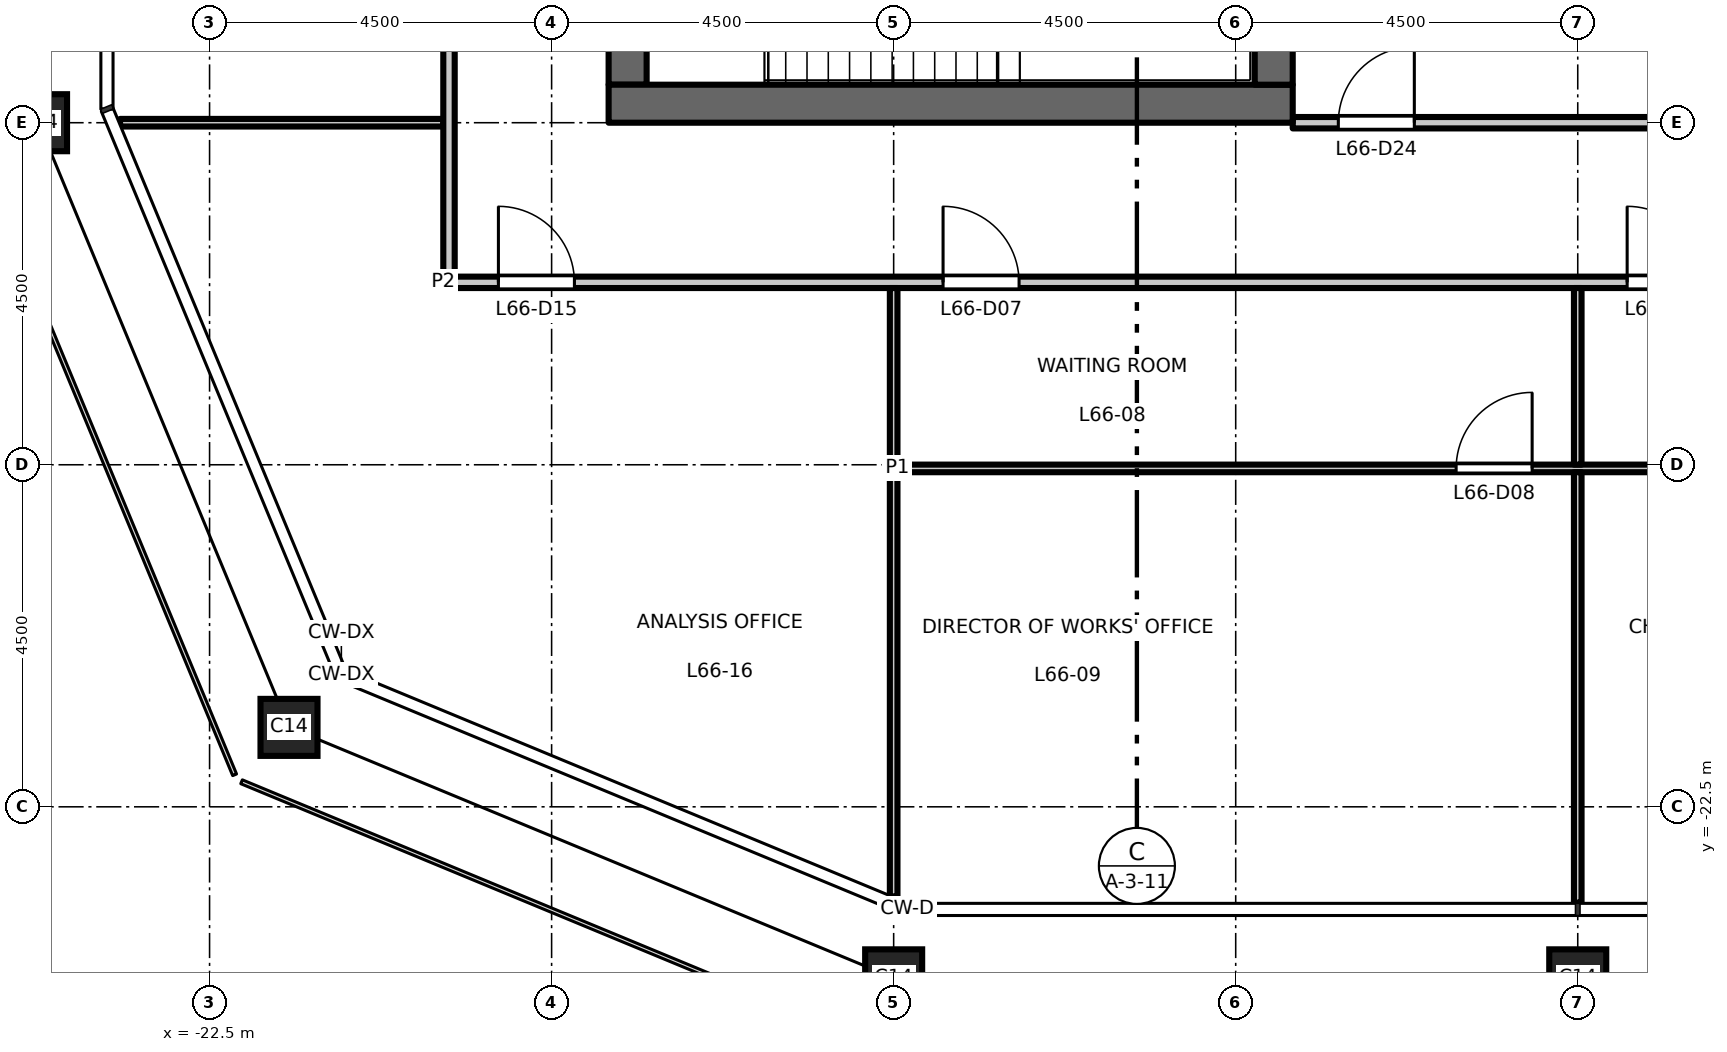
"""IFC4 building model, lengths in metres.
Left out: names, types, materials, properties, quantities, classifications, styles, units other than length and angle.
Written with IfcOpenShell. Run it as: python <this file> out.ifc"""

import sys

from ifc_helpers import new_model, si_unit, direction, frame, frame_2d, origin, origin_2d, place, context, subcontext, project, spatial, rectangle, hollow_rectangle, extrude, element, fill, save


model = new_model("IFC4")
c1 = context("Model", 3, precision=1e-05, world=origin(), true_north=direction((0.0, 1.0)))
c2 = subcontext(c1, "Body", "Model", "MODEL_VIEW")
j1 = project(units=[si_unit("LENGTHUNIT", "METRE"), si_unit("PLANEANGLEUNIT", "RADIAN")], contexts=[c1])
p1 = place(None, origin())
s1 = spatial("IfcSite", under=j1, at=p1, CompositionType="ELEMENT")
p2 = place(p1, origin())
s2 = spatial("IfcBuilding", under=s1, at=p2, CompositionType="ELEMENT")
p3 = place(p2, frame((0.0, 0.0, 307.7)))
s3 = spatial("IfcBuildingStorey", under=s2, at=p3, CompositionType="ELEMENT", Elevation=307.7)
for number, where, z_axis, x_axis in (
    (1, (-13.5, -24.75, 0.0), (0.0, 0.0, 1.0), (1.0, 0.0, 0.0)),
    (2, (-4.5, -24.75, 0.0), (0.0, 0.0, 1.0), (1.0, 0.0, 0.0)),
    (3, (-24.75, -13.5, 0.0), (0.0, 0.0, 1.0), (1.0, 0.0, 0.0)),
    (4, (-21.455, -21.455, 0.0), (0.0, 0.0, 1.0), (1.0, 0.0, 0.0)),
):
    element("IfcColumn", number, at=place(p3, frame(where, z_axis=z_axis, x_axis=x_axis)), inside=s3, PredefinedType="COLUMN", context=c2, shape_type="SweptSolid", body=[
        extrude(hollow_rectangle(XDim=0.75, YDim=0.75, WallThickness=0.04, at=origin_2d()), origin(), (0.0, 0.0, 1.0), 4.5),
    ])
p4 = place(p3, frame((-17.0, -13.0, 0.0), z_axis=(0.0, 0.0, 1.0), x_axis=(0.0, 1.0, 0.0)))
e5 = element("IfcWall", 5, at=p4, inside=s3, PredefinedType="SHEAR", context=c2, shape_type="SweptSolid", body=[
    extrude(rectangle(XDim=26.0, YDim=0.5, at=frame_2d((13.0, 0.0))), origin(), (0.0, 0.0, 1.0), 4.35),
])
p5 = place(p4, frame((16.825, 0.0, 0.0)))
e6 = element("IfcOpeningElement", 6, at=p5, cuts=e5, PredefinedType="OPENING", context=c2, shape_type="SweptSolid", body=[
    extrude(rectangle(XDim=1.8, YDim=2.1, at=frame_2d((0.9, 1.05))), frame((0.0, 0.26, 0.0), z_axis=(0.0, -1.0, 0.0), x_axis=(1.0, 0.0, 0.0)), (0.0, 0.0, 1.0), 0.52),
])
p6 = place(p4, frame((7.375, 0.0, 0.0)))
e7 = element("IfcOpeningElement", 7, at=p6, cuts=e5, PredefinedType="OPENING", context=c2, shape_type="SweptSolid", body=[
    extrude(rectangle(XDim=1.8, YDim=2.1, at=frame_2d((0.9, 1.05))), frame((0.0, 0.26, 0.0), z_axis=(0.0, -1.0, 0.0), x_axis=(1.0, 0.0, 0.0)), (0.0, 0.0, 1.0), 0.52),
])
p7 = place(p3, frame((-8.25, -13.25, 0.0), z_axis=(0.0, 0.0, 1.0), x_axis=(-1.0, 0.0, 0.0)))
e8 = element("IfcWall", 8, at=p7, inside=s3, PredefinedType="SHEAR", context=c2, shape_type="SweptSolid", body=[
    extrude(rectangle(XDim=9.0, YDim=0.5, at=frame_2d((4.5, 0.0))), origin(), (0.0, 0.0, 1.0), 4.35),
])
p8 = place(p3, frame((-8.5, -13.0, 0.0), z_axis=(0.0, 0.0, 1.0), x_axis=(0.0, 1.0, 0.0)))
e9 = element("IfcWall", 9, at=p8, inside=s3, PredefinedType="SHEAR", context=c2, shape_type="SweptSolid", body=[
    extrude(rectangle(XDim=26.0, YDim=0.5, at=frame_2d((13.0, 0.0))), origin(), (0.0, 0.0, 1.0), 4.35),
])
p9 = place(p3, frame((-13.45, -18.048, 0.0), z_axis=(0.0, 0.0, 1.0), x_axis=(1.0, 0.0, 0.0)))
e10 = element("IfcWall", 10, at=p9, inside=s3, PredefinedType="PARTITIONING", context=c2, shape_type="SweptSolid", body=[
    extrude(rectangle(XDim=17.9, YDim=0.1, at=frame_2d((8.95, 0.0))), origin(), (0.0, 0.0, 1.0), 3.99),
])
p10 = place(p9, frame((7.35, 0.0, 0.0)))
e11 = element("IfcOpeningElement", 11, at=p10, cuts=e10, PredefinedType="OPENING", context=c2, shape_type="SweptSolid", body=[
    extrude(rectangle(XDim=1.0, YDim=2.1, at=frame_2d((0.5, 1.05))), frame((0.0, 0.06, 0.0), z_axis=(0.0, -1.0, 0.0), x_axis=(1.0, 0.0, 0.0)), (0.0, 0.0, 1.0), 0.12),
])
p11 = place(p9, frame((16.35, 0.0, 0.0)))
e12 = element("IfcOpeningElement", 12, at=p11, cuts=e10, PredefinedType="OPENING", context=c2, shape_type="SweptSolid", body=[
    extrude(rectangle(XDim=1.0, YDim=2.1, at=frame_2d((0.5, 1.05))), frame((0.0, 0.06, 0.0), z_axis=(0.0, -1.0, 0.0), x_axis=(1.0, 0.0, 0.0)), (0.0, 0.0, 1.0), 0.12),
])
p12 = place(p3, frame((-19.425, -15.6, 0.0), z_axis=(0.0, 0.0, 1.0), x_axis=(1.0, 0.0, 0.0)))
e13 = element("IfcWall", 13, at=p12, inside=s3, PredefinedType="PARTITIONING", context=c2, shape_type="SweptSolid", body=[
    extrude(rectangle(XDim=38.85, YDim=0.15, at=frame_2d((19.425, 0.0))), origin(), (0.0, 0.0, 1.0), 4.35),
])
p13 = place(p12, frame((6.575, 0.0, 0.0)))
e14 = element("IfcOpeningElement", 14, at=p13, cuts=e13, PredefinedType="OPENING", context=c2, shape_type="SweptSolid", body=[
    extrude(rectangle(XDim=1.0, YDim=2.1, at=frame_2d((0.5, 1.05))), frame((0.0, 0.085, 0.0), z_axis=(0.0, -1.0, 0.0), x_axis=(1.0, 0.0, 0.0)), (0.0, 0.0, 1.0), 0.17),
])
p14 = place(p12, frame((15.575, 0.0, 0.0)))
e15 = element("IfcOpeningElement", 15, at=p14, cuts=e13, PredefinedType="OPENING", context=c2, shape_type="SweptSolid", body=[
    extrude(rectangle(XDim=1.0, YDim=2.1, at=frame_2d((0.5, 1.05))), frame((0.0, 0.085, 0.0), z_axis=(0.0, -1.0, 0.0), x_axis=(1.0, 0.0, 0.0)), (0.0, 0.0, 1.0), 0.17),
])
p15 = place(p12, frame((24.575, 0.0, 0.0)))
e16 = element("IfcOpeningElement", 16, at=p15, cuts=e13, PredefinedType="OPENING", context=c2, shape_type="SweptSolid", body=[
    extrude(rectangle(XDim=1.0, YDim=2.1, at=frame_2d((0.5, 1.05))), frame((0.0, 0.085, 0.0), z_axis=(0.0, -1.0, 0.0), x_axis=(1.0, 0.0, 0.0)), (0.0, 0.0, 1.0), 0.17),
])
p16 = place(p12, frame((0.725, 0.0, 0.0)))
e17 = element("IfcOpeningElement", 17, at=p16, cuts=e13, PredefinedType="OPENING", context=c2, shape_type="SweptSolid", body=[
    extrude(rectangle(XDim=1.0, YDim=2.1, at=frame_2d((0.5, 1.05))), frame((0.0, 0.085, 0.0), z_axis=(0.0, -1.0, 0.0), x_axis=(1.0, 0.0, 0.0)), (0.0, 0.0, 1.0), 0.17),
])
p17 = place(p12, frame((37.075, 0.0, 0.0)))
e18 = element("IfcOpeningElement", 18, at=p17, cuts=e13, PredefinedType="OPENING", context=c2, shape_type="SweptSolid", body=[
    extrude(rectangle(XDim=1.0, YDim=2.1, at=frame_2d((0.5, 1.05))), frame((0.0, 0.085, 0.0), z_axis=(0.0, -1.0, 0.0), x_axis=(1.0, 0.0, 0.0)), (0.0, 0.0, 1.0), 0.17),
])
p18 = place(p3, frame((-23.678, -13.5, 0.0), z_axis=(0.0, 0.0, 1.0), x_axis=(1.0, 0.0, 0.0)))
e19 = element("IfcWall", 19, at=p18, inside=s3, PredefinedType="PARTITIONING", context=c2, shape_type="SweptSolid", body=[
    extrude(rectangle(XDim=4.253, YDim=0.1, at=frame_2d((2.126, 0.0))), origin(), (0.0, 0.0, 1.0), 4.35),
])
p19 = place(p3, frame((-8.25, -13.5, 0.0), z_axis=(0.0, 0.0, 1.0), x_axis=(1.0, 0.0, 0.0)))
e20 = element("IfcWall", 20, at=p19, inside=s3, PredefinedType="PARTITIONING", context=c2, shape_type="SweptSolid", body=[
    extrude(rectangle(XDim=16.5, YDim=0.15, at=frame_2d((8.25, 0.0))), origin(), (0.0, 0.0, 1.0), 4.35),
])
p20 = place(p19, frame((0.6, 0.0, 0.0)))
e21 = element("IfcOpeningElement", 21, at=p20, cuts=e20, PredefinedType="OPENING", context=c2, shape_type="SweptSolid", body=[
    extrude(rectangle(XDim=1.0, YDim=2.1, at=frame_2d((0.5, 1.05))), frame((0.0, 0.085, 0.0), z_axis=(0.0, -1.0, 0.0), x_axis=(1.0, 0.0, 0.0)), (0.0, 0.0, 1.0), 0.17),
])
p21 = place(p3, frame((-19.35, -15.525, 0.0), z_axis=(0.0, 0.0, 1.0), x_axis=(0.0, 1.0, 0.0)))
e22 = element("IfcWall", 22, at=p21, inside=s3, PredefinedType="PARTITIONING", context=c2, shape_type="SweptSolid", body=[
    extrude(rectangle(XDim=31.05, YDim=0.15, at=frame_2d((15.525, 0.0))), origin(), (0.0, 0.0, 1.0), 4.35),
])
p22 = place(p21, frame((29.475, 0.0, 0.0)))
e23 = element("IfcOpeningElement", 23, at=p22, cuts=e22, PredefinedType="OPENING", context=c2, shape_type="SweptSolid", body=[
    extrude(rectangle(XDim=1.0, YDim=2.1, at=frame_2d((0.5, 1.05))), frame((0.0, 0.085, 0.0), z_axis=(0.0, -1.0, 0.0), x_axis=(1.0, 0.0, 0.0)), (0.0, 0.0, 1.0), 0.17),
])
p23 = place(p21, frame((9.375, 0.0, 0.0)))
e24 = element("IfcOpeningElement", 24, at=p23, cuts=e22, PredefinedType="OPENING", context=c2, shape_type="SweptSolid", body=[
    extrude(rectangle(XDim=1.0, YDim=2.1, at=frame_2d((0.5, 1.05))), frame((0.0, 0.085, 0.0), z_axis=(0.0, -1.0, 0.0), x_axis=(1.0, 0.0, 0.0)), (0.0, 0.0, 1.0), 0.17),
])
p24 = place(p21, frame((11.625, 0.0, 0.0)))
e25 = element("IfcOpeningElement", 25, at=p24, cuts=e22, PredefinedType="OPENING", context=c2, shape_type="SweptSolid", body=[
    extrude(rectangle(XDim=1.0, YDim=2.1, at=frame_2d((0.5, 1.05))), frame((0.0, 0.085, 0.0), z_axis=(0.0, -1.0, 0.0), x_axis=(1.0, 0.0, 0.0)), (0.0, 0.0, 1.0), 0.17),
])
p25 = place(p21, frame((27.375, 0.0, 0.0)))
e26 = element("IfcOpeningElement", 26, at=p25, cuts=e22, PredefinedType="OPENING", context=c2, shape_type="SweptSolid", body=[
    extrude(rectangle(XDim=1.0, YDim=2.1, at=frame_2d((0.5, 1.05))), frame((0.0, 0.085, 0.0), z_axis=(0.0, -1.0, 0.0), x_axis=(1.0, 0.0, 0.0)), (0.0, 0.0, 1.0), 0.17),
])
p26 = place(p3, frame((-13.5, -23.678, 0.0), z_axis=(0.0, 0.0, 1.0), x_axis=(0.0, 1.0, 0.0)))
e27 = element("IfcWall", 27, at=p26, inside=s3, PredefinedType="PARTITIONING", context=c2, shape_type="SweptSolid", body=[
    extrude(rectangle(XDim=8.003, YDim=0.1, at=frame_2d((4.001, 0.0))), origin(), (0.0, 0.0, 1.0), 3.75),
])
p27 = place(p3, frame((-4.5, -23.76, 0.0), z_axis=(0.0, 0.0, 1.0), x_axis=(0.0, 1.0, 0.0)))
e28 = element("IfcWall", 28, at=p27, inside=s3, PredefinedType="PARTITIONING", context=c2, shape_type="SweptSolid", body=[
    extrude(rectangle(XDim=5.662, YDim=0.1, at=frame_2d((2.831, 0.0))), origin(), (0.0, 0.0, 1.0), 3.65),
])
p28 = place(p3, frame((-4.5, -17.998, 0.0), z_axis=(0.0, 0.0, 1.0), x_axis=(0.0, 1.0, 0.0)))
e29 = element("IfcWall", 29, at=p28, inside=s3, PredefinedType="PARTITIONING", context=c2, shape_type="SweptSolid", body=[
    extrude(rectangle(XDim=2.323, YDim=0.1, at=frame_2d((1.162, 0.0))), origin(), (0.0, 0.0, 1.0), 3.65),
])
p29 = place(p13, origin())
e30 = element("IfcDoor", 30, at=p29, inside=s3, OperationType="SINGLE_SWING_LEFT", PredefinedType="DOOR", context=c2, shape_type="SweptSolid", body=[
    extrude(rectangle(XDim=1.0, YDim=2.1, at=frame_2d((0.5, 1.05))), frame((0.0, 0.025, 0.0), z_axis=(0.0, -1.0, 0.0), x_axis=(1.0, 0.0, 0.0)), (0.0, 0.0, 1.0), 0.05),
])
fill(e14, e30)
p30 = place(p10, origin())
e31 = element("IfcDoor", 31, at=p30, inside=s3, OperationType="SINGLE_SWING_RIGHT", PredefinedType="DOOR", context=c2, shape_type="SweptSolid", body=[
    extrude(rectangle(XDim=1.0, YDim=2.1, at=frame_2d((0.5, 1.05))), frame((0.0, 0.025, 0.0), z_axis=(0.0, -1.0, 0.0), x_axis=(1.0, 0.0, 0.0)), (0.0, 0.0, 1.0), 0.05),
])
fill(e11, e31)
p31 = place(p14, origin())
e32 = element("IfcDoor", 32, at=p31, inside=s3, OperationType="SINGLE_SWING_LEFT", PredefinedType="DOOR", context=c2, shape_type="SweptSolid", body=[
    extrude(rectangle(XDim=1.0, YDim=2.1, at=frame_2d((0.5, 1.05))), frame((0.0, 0.025, 0.0), z_axis=(0.0, -1.0, 0.0), x_axis=(1.0, 0.0, 0.0)), (0.0, 0.0, 1.0), 0.05),
])
fill(e15, e32)
p32 = place(p16, origin())
e33 = element("IfcDoor", 33, at=p32, inside=s3, OperationType="SINGLE_SWING_LEFT", PredefinedType="DOOR", context=c2, shape_type="SweptSolid", body=[
    extrude(rectangle(XDim=1.0, YDim=2.1, at=frame_2d((0.5, 1.05))), frame((0.0, 0.025, 0.0), z_axis=(0.0, -1.0, 0.0), x_axis=(1.0, 0.0, 0.0)), (0.0, 0.0, 1.0), 0.05),
])
fill(e17, e33)
p33 = place(p20, origin())
e34 = element("IfcDoor", 34, at=p33, inside=s3, OperationType="SINGLE_SWING_RIGHT", PredefinedType="DOOR", context=c2, shape_type="SweptSolid", body=[
    extrude(rectangle(XDim=1.0, YDim=2.1, at=frame_2d((0.5, 1.05))), frame((0.0, 0.025, 0.0), z_axis=(0.0, -1.0, 0.0), x_axis=(1.0, 0.0, 0.0)), (0.0, 0.0, 1.0), 0.05),
])
fill(e21, e34)
save(model, sys.argv[1])
